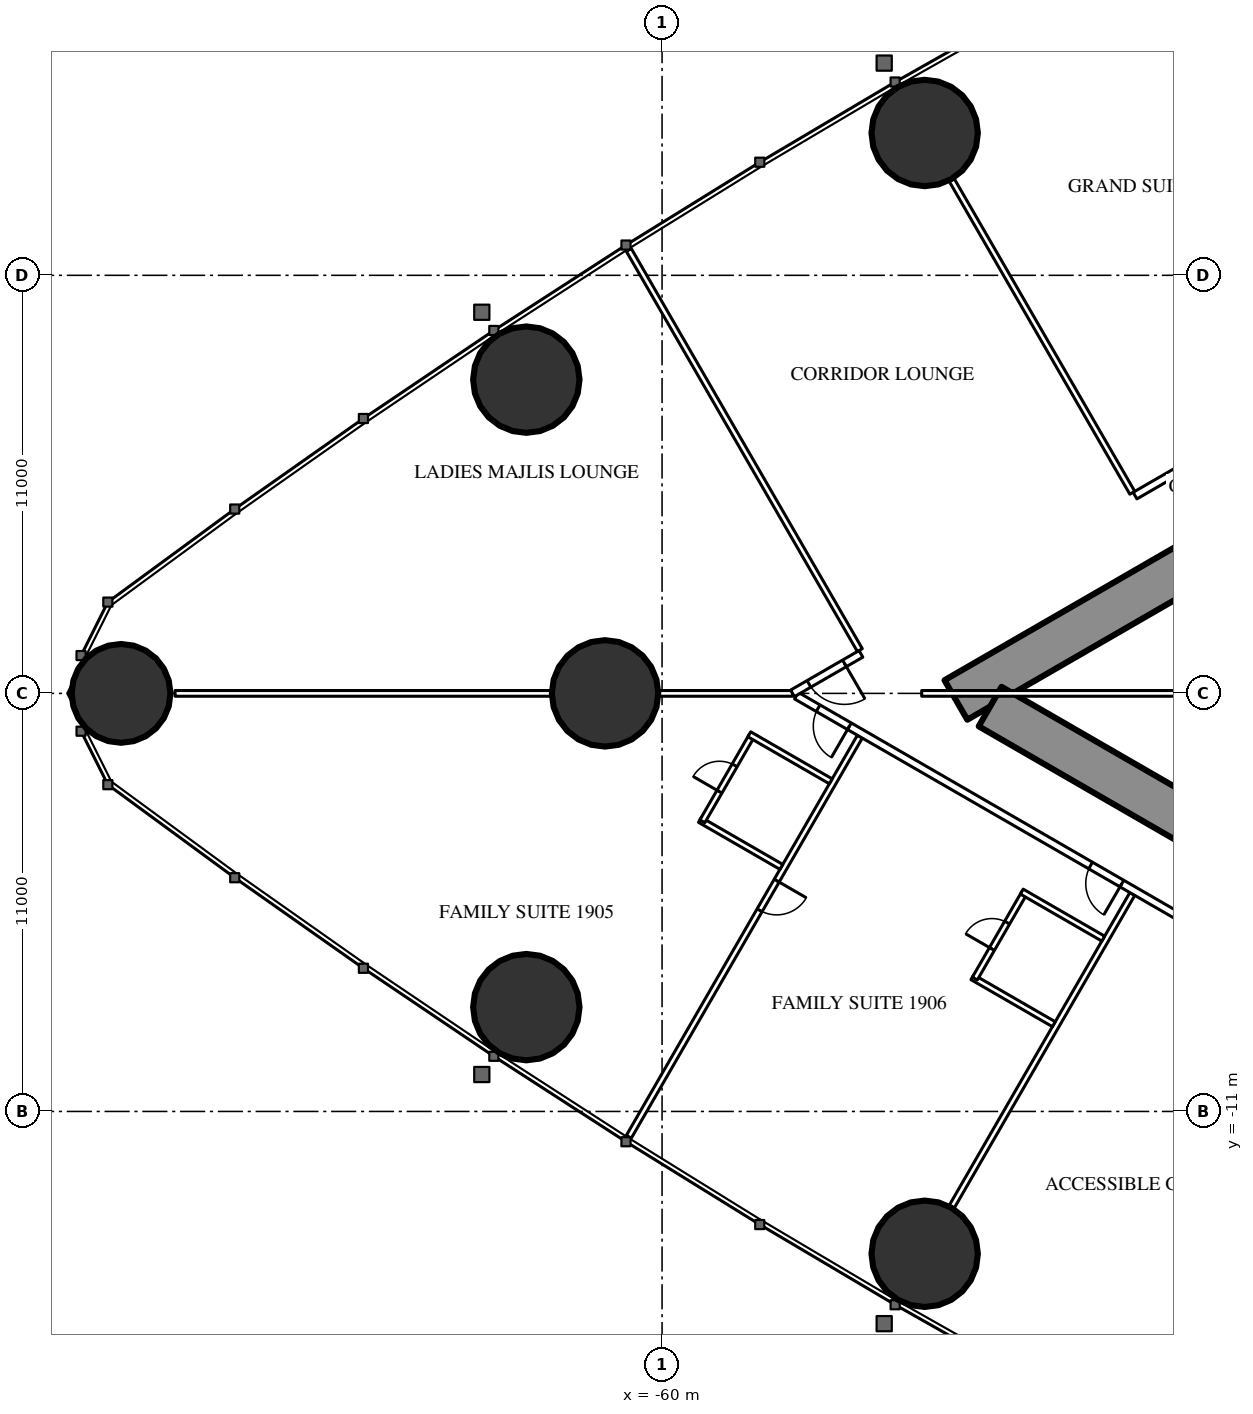
"""IFC4 building model, lengths in metres.
Left out: names, types, materials, properties, quantities, classifications, styles, units other than length and angle.
Written with IfcOpenShell. Run it as: python <this file> out.ifc"""

import sys

from ifc_helpers import new_model, si_unit, direction, frame, frame_2d, origin, origin_2d, place, context, subcontext, project, spatial, rectangle, hollow_circle, extrude, element, fill, save


model = new_model("IFC4")
c1 = context("Model", 3, precision=1e-05, world=origin(), true_north=direction((0.0, 1.0)))
c2 = subcontext(c1, "Body", "Model", "MODEL_VIEW")
j1 = project(units=[si_unit("LENGTHUNIT", "METRE"), si_unit("PLANEANGLEUNIT", "RADIAN")], contexts=[c1])
p1 = place(None, origin())
s1 = spatial("IfcSite", under=j1, at=p1, CompositionType="ELEMENT")
p2 = place(p1, origin())
s2 = spatial("IfcBuilding", under=s1, at=p2, CompositionType="ELEMENT")
p3 = place(p2, frame((0.0, 0.0, 74.0)))
s3 = spatial("IfcBuildingStorey", under=s2, at=p3, CompositionType="ELEMENT", Elevation=74.0)
p4 = place(p3, frame((-74.235, 0.0, 0.0), z_axis=(0.0, 0.0, 1.0), x_axis=(1.0, 0.0, 0.0)))
e1 = element("IfcColumn", 1, at=p4, inside=s3, PredefinedType="COLUMN", context=c2, shape_type="SweptSolid", body=[
    extrude(hollow_circle(Radius=1.3, WallThickness=0.1, at=origin_2d()), origin(), (0.0, 0.0, 1.0), 3.5),
])
for number, where, z_axis, x_axis in (
    (2, (-63.572, -8.255, 0.0), (0.0, 0.0, 1.0), (1.0, 0.0, 0.0)),
    (3, (-53.09, -14.745, 0.0), (0.0, 0.0, 1.0), (1.0, 0.0, 0.0)),
    (4, (-53.09, 14.745, 0.0), (0.0, 0.0, 1.0), (1.0, 0.0, 0.0)),
    (5, (-63.572, 8.255, 0.0), (0.0, 0.0, 1.0), (1.0, 0.0, 0.0)),
):
    element("IfcColumn", number, at=place(p3, frame(where, z_axis=z_axis, x_axis=x_axis)), inside=s3, PredefinedType="COLUMN", context=c2, shape_type="SweptSolid", body=[
        extrude(hollow_circle(Radius=1.4, WallThickness=0.12, at=origin_2d()), origin(), (0.0, 0.0, 1.0), 3.5),
    ])
p5 = place(p3, frame((-61.5, 0.0, 0.0), z_axis=(0.0, 0.0, 1.0), x_axis=(1.0, 0.0, 0.0)))
e6 = element("IfcColumn", 6, at=p5, inside=s3, PredefinedType="COLUMN", context=c2, shape_type="SweptSolid", body=[
    extrude(hollow_circle(Radius=1.4, WallThickness=0.1, at=origin_2d()), origin(), (0.0, 0.0, 1.0), 3.5),
])
p6 = place(p3, frame((-27.2, 14.3, 0.0), z_axis=(0.0, 0.0, 1.0), x_axis=(-0.866026593062, -0.499997940104, 0.0)))
e7 = element("IfcWall", 7, at=p6, inside=s3, PredefinedType="SHEAR", context=c2, shape_type="SweptSolid", body=[
    extrude(rectangle(XDim=28.946, YDim=1.2, at=frame_2d((14.473, 0.0))), origin(), (0.0, 0.0, 1.0), 3.5),
])
p7 = place(p6, frame((4.6, 0.0, 0.0)))
e8 = element("IfcOpeningElement", 8, at=p7, cuts=e7, PredefinedType="OPENING", context=c2, shape_type="SweptSolid", body=[
    extrude(rectangle(XDim=1.0, YDim=2.2, at=frame_2d((0.5, 1.1))), frame((0.0, 0.61, 0.0), z_axis=(0.0, -1.0, 0.0), x_axis=(1.0, 0.0, 0.0)), (0.0, 0.0, 1.0), 1.22),
])
p8 = place(p6, frame((13.395, 0.0, 0.0)))
e9 = element("IfcOpeningElement", 9, at=p8, cuts=e7, PredefinedType="OPENING", context=c2, shape_type="SweptSolid", body=[
    extrude(rectangle(XDim=1.8, YDim=2.2, at=frame_2d((0.9, 1.1))), frame((0.0, 0.61, 0.0), z_axis=(0.0, -1.0, 0.0), x_axis=(1.0, 0.0, 0.0)), (0.0, 0.0, 1.0), 1.22),
])
p9 = place(p3, frame((-27.2, -14.3, 0.0), z_axis=(0.0, 0.0, 1.0), x_axis=(-0.866024021859, 0.500002393557, 0.0)))
e10 = element("IfcWall", 10, at=p9, inside=s3, PredefinedType="SHEAR", context=c2, shape_type="SweptSolid", body=[
    extrude(rectangle(XDim=27.907, YDim=1.2, at=frame_2d((13.954, 0.0))), origin(), (0.0, 0.0, 1.0), 3.5),
])
p10 = place(p9, frame((4.6, 0.0, 0.0)))
e11 = element("IfcOpeningElement", 11, at=p10, cuts=e10, PredefinedType="OPENING", context=c2, shape_type="SweptSolid", body=[
    extrude(rectangle(XDim=1.0, YDim=2.2, at=frame_2d((0.5, 1.1))), frame((0.0, 0.61, 0.0), z_axis=(0.0, -1.0, 0.0), x_axis=(1.0, 0.0, 0.0)), (0.0, 0.0, 1.0), 1.22),
])
p11 = place(p9, frame((13.395, 0.0, 0.0)))
e12 = element("IfcOpeningElement", 12, at=p11, cuts=e10, PredefinedType="OPENING", context=c2, shape_type="SweptSolid", body=[
    extrude(rectangle(XDim=1.8, YDim=2.2, at=frame_2d((0.9, 1.1))), frame((0.0, 0.61, 0.0), z_axis=(0.0, -1.0, 0.0), x_axis=(1.0, 0.0, 0.0)), (0.0, 0.0, 1.0), 1.22),
])
p12 = place(p3, frame((-47.627, 5.278, 0.0), z_axis=(0.0, 0.0, 1.0), x_axis=(-0.500009844318, 0.86601972009, 0.0)))
e13 = element("IfcWall", 13, at=p12, inside=s3, PredefinedType="PARTITIONING", context=c2, shape_type="SweptSolid", body=[
    extrude(rectangle(XDim=9.51, YDim=0.15, at=frame_2d((4.755, 0.0))), origin(), (0.0, 0.0, 1.0), 2.25),
])
p13 = place(p3, frame((-54.796, 1.139, 0.0), z_axis=(0.0, 0.0, 1.0), x_axis=(-0.499998860433, 0.866026061713, 0.0)))
e14 = element("IfcWall", 14, at=p13, inside=s3, PredefinedType="PARTITIONING", context=c2, shape_type="SweptSolid", body=[
    extrude(rectangle(XDim=12.157, YDim=0.15, at=frame_2d((6.078, 0.0))), origin(), (0.0, 0.0, 1.0), 3.25),
])
p14 = place(p3, frame((-47.627, -5.278, 0.0), z_axis=(0.0, 0.0, 1.0), x_axis=(-0.500009844318, -0.86601972009, 0.0)))
e15 = element("IfcWall", 15, at=p14, inside=s3, PredefinedType="PARTITIONING", context=c2, shape_type="SweptSolid", body=[
    extrude(rectangle(XDim=9.51, YDim=0.15, at=frame_2d((4.755, 0.0))), origin(), (0.0, 0.0, 1.0), 2.25),
])
p15 = place(p3, frame((-54.796, -1.139, 0.0), z_axis=(0.0, 0.0, 1.0), x_axis=(-0.499998860433, -0.866026061713, 0.0)))
e16 = element("IfcWall", 16, at=p15, inside=s3, PredefinedType="PARTITIONING", context=c2, shape_type="SweptSolid", body=[
    extrude(rectangle(XDim=12.157, YDim=0.15, at=frame_2d((6.078, 0.0))), origin(), (0.0, 0.0, 1.0), 3.25),
])
p16 = place(p15, frame((4.375, 0.0, 0.0)))
e17 = element("IfcOpeningElement", 17, at=p16, cuts=e16, PredefinedType="OPENING", context=c2, shape_type="SweptSolid", body=[
    extrude(rectangle(XDim=0.9, YDim=2.2, at=frame_2d((0.45, 1.1))), frame((0.0, 0.085, 0.0), z_axis=(0.0, -1.0, 0.0), x_axis=(1.0, 0.0, 0.0)), (0.0, 0.0, 1.0), 0.17),
])
p17 = place(p3, frame((-56.568, 0.0, 0.0), z_axis=(0.0, 0.0, 1.0), x_axis=(-1.0, 0.0, 0.0)))
e18 = element("IfcWall", 18, at=p17, inside=s3, PredefinedType="PARTITIONING", context=c2, shape_type="SweptSolid", body=[
    extrude(rectangle(XDim=16.247, YDim=0.15, at=frame_2d((8.124, 0.0))), origin(), (0.0, 0.0, 1.0), 2.25),
])
p18 = place(p3, frame((-36.92, -11.344, 0.0), z_axis=(0.0, 0.0, 1.0), x_axis=(-0.866028313256, 0.499994960614, 0.0)))
e19 = element("IfcWall", 19, at=p18, inside=s3, PredefinedType="PARTITIONING", context=c2, shape_type="SweptSolid", body=[
    extrude(rectangle(XDim=22.568, YDim=0.2, at=frame_2d((11.284, 0.0))), origin(), (0.0, 0.0, 1.0), 3.25),
])
p19 = place(p18, frame((20.958, 0.0, 0.0)))
e20 = element("IfcOpeningElement", 20, at=p19, cuts=e19, PredefinedType="OPENING", context=c2, shape_type="SweptSolid", body=[
    extrude(rectangle(XDim=0.95, YDim=2.2, at=frame_2d((0.475, 1.1))), frame((0.0, 0.11, 0.0), z_axis=(0.0, -1.0, 0.0), x_axis=(1.0, 0.0, 0.0)), (0.0, 0.0, 1.0), 0.22),
])
p20 = place(p18, frame((12.68, 0.0, 0.0)))
e21 = element("IfcOpeningElement", 21, at=p20, cuts=e19, PredefinedType="OPENING", context=c2, shape_type="SweptSolid", body=[
    extrude(rectangle(XDim=0.95, YDim=2.2, at=frame_2d((0.475, 1.1))), frame((0.0, 0.11, 0.0), z_axis=(0.0, -1.0, 0.0), x_axis=(1.0, 0.0, 0.0)), (0.0, 0.0, 1.0), 0.22),
])
p21 = place(p18, frame((3.35, 0.0, 0.0)))
e22 = element("IfcOpeningElement", 22, at=p21, cuts=e19, PredefinedType="OPENING", context=c2, shape_type="SweptSolid", body=[
    extrude(rectangle(XDim=1.0, YDim=2.2, at=frame_2d((0.5, 1.1))), frame((0.0, 0.11, 0.0), z_axis=(0.0, -1.0, 0.0), x_axis=(1.0, 0.0, 0.0)), (0.0, 0.0, 1.0), 0.22),
])
p22 = place(p3, frame((-37.7, 10.894, 0.0), z_axis=(0.0, 0.0, 1.0), x_axis=(-0.866024459167, -0.500001636122, 0.0)))
e23 = element("IfcWall", 23, at=p22, inside=s3, PredefinedType="PARTITIONING", context=c2, shape_type="SweptSolid", body=[
    extrude(rectangle(XDim=11.38, YDim=0.2, at=frame_2d((5.69, 0.0))), origin(), (0.0, 0.0, 1.0), 3.25),
])
p23 = place(p22, frame((0.6, 0.0, 0.0)))
e24 = element("IfcOpeningElement", 24, at=p23, cuts=e23, PredefinedType="OPENING", context=c2, shape_type="SweptSolid", body=[
    extrude(rectangle(XDim=0.95, YDim=2.2, at=frame_2d((0.475, 1.1))), frame((0.0, 0.11, 0.0), z_axis=(0.0, -1.0, 0.0), x_axis=(1.0, 0.0, 0.0)), (0.0, 0.0, 1.0), 0.22),
])
p24 = place(p3, frame((-54.768, 1.04, 0.0), z_axis=(0.0, 0.0, 1.0), x_axis=(-0.866052632827, -0.499952834948, 0.0)))
e25 = element("IfcWall", 25, at=p24, inside=s3, PredefinedType="PARTITIONING", context=c2, shape_type="SweptSolid", body=[
    extrude(rectangle(XDim=2.079, YDim=0.2, at=frame_2d((1.04, 0.0))), origin(), (0.0, 0.0, 1.0), 3.25),
])
p25 = place(p24, frame((0.5, 0.0, 0.0)))
e26 = element("IfcOpeningElement", 26, at=p25, cuts=e25, PredefinedType="OPENING", context=c2, shape_type="SweptSolid", body=[
    extrude(rectangle(XDim=1.079, YDim=2.2, at=frame_2d((0.54, 1.1))), frame((0.0, 0.11, 0.0), z_axis=(0.0, -1.0, 0.0), x_axis=(1.0, 0.0, 0.0)), (0.0, 0.0, 1.0), 0.22),
])
p26 = place(p3, frame((-56.861, -4.565, 0.0), z_axis=(0.0, 0.0, 1.0), x_axis=(-0.86604923931, 0.499958713387, 0.0)))
e27 = element("IfcWall", 27, at=p26, inside=s3, PredefinedType="PARTITIONING", context=c2, shape_type="SweptSolid", body=[
    extrude(rectangle(XDim=2.475, YDim=0.15, at=frame_2d((1.237, 0.0))), origin(), (0.0, 0.0, 1.0), 3.25),
])
p27 = place(p3, frame((-57.639, -1.114, 0.0), z_axis=(0.0, 0.0, 1.0), x_axis=(-0.500006934395, -0.866021400173, 0.0)))
e28 = element("IfcWall", 28, at=p27, inside=s3, PredefinedType="PARTITIONING", context=c2, shape_type="SweptSolid", body=[
    extrude(rectangle(XDim=2.6, YDim=0.15, at=frame_2d((1.3, 0.0))), origin(), (0.0, 0.0, 1.0), 3.25),
])
p28 = place(p27, frame((0.9, 0.0, 0.0)))
e29 = element("IfcOpeningElement", 29, at=p28, cuts=e28, PredefinedType="OPENING", context=c2, shape_type="SweptSolid", body=[
    extrude(rectangle(XDim=0.8, YDim=2.2, at=frame_2d((0.4, 1.1))), frame((0.0, 0.085, 0.0), z_axis=(0.0, -1.0, 0.0), x_axis=(1.0, 0.0, 0.0)), (0.0, 0.0, 1.0), 0.17),
])
p29 = place(p3, frame((-55.561, -2.313, 0.0), z_axis=(0.0, 0.0, 1.0), x_axis=(-0.86604923931, 0.499958713387, 0.0)))
e30 = element("IfcWall", 30, at=p29, inside=s3, PredefinedType="PARTITIONING", context=c2, shape_type="SweptSolid", body=[
    extrude(rectangle(XDim=2.475, YDim=0.15, at=frame_2d((1.237, 0.0))), origin(), (0.0, 0.0, 1.0), 3.25),
])
p30 = place(p3, frame((-49.692, -8.704, 0.0), z_axis=(0.0, 0.0, 1.0), x_axis=(-0.866073894602, 0.499916002032, 0.0)))
e31 = element("IfcWall", 31, at=p30, inside=s3, PredefinedType="PARTITIONING", context=c2, shape_type="SweptSolid", body=[
    extrude(rectangle(XDim=2.475, YDim=0.15, at=frame_2d((1.238, 0.0))), origin(), (0.0, 0.0, 1.0), 3.25),
])
p31 = place(p3, frame((-50.47, -5.253, 0.0), z_axis=(0.0, 0.0, 1.0), x_axis=(-0.500006934395, -0.866021400173, 0.0)))
e32 = element("IfcWall", 32, at=p31, inside=s3, PredefinedType="PARTITIONING", context=c2, shape_type="SweptSolid", body=[
    extrude(rectangle(XDim=2.6, YDim=0.15, at=frame_2d((1.3, 0.0))), origin(), (0.0, 0.0, 1.0), 3.25),
])
p32 = place(p31, frame((0.9, 0.0, 0.0)))
e33 = element("IfcOpeningElement", 33, at=p32, cuts=e32, PredefinedType="OPENING", context=c2, shape_type="SweptSolid", body=[
    extrude(rectangle(XDim=0.8, YDim=2.2, at=frame_2d((0.4, 1.1))), frame((0.0, 0.085, 0.0), z_axis=(0.0, -1.0, 0.0), x_axis=(1.0, 0.0, 0.0)), (0.0, 0.0, 1.0), 0.17),
])
p33 = place(p3, frame((-48.392, -6.453, 0.0), z_axis=(0.0, 0.0, 1.0), x_axis=(-0.86604923931, 0.499958713387, 0.0)))
e34 = element("IfcWall", 34, at=p33, inside=s3, PredefinedType="PARTITIONING", context=c2, shape_type="SweptSolid", body=[
    extrude(rectangle(XDim=2.475, YDim=0.15, at=frame_2d((1.237, 0.0))), origin(), (0.0, 0.0, 1.0), 3.25),
])
p34 = place(p3, frame((-44.575, 0.0, 0.0), z_axis=(0.0, 0.0, 1.0), x_axis=(-1.0, 0.0, 0.0)))
e35 = element("IfcWall", 35, at=p34, inside=s3, PredefinedType="PARTITIONING", context=c2, shape_type="SweptSolid", body=[
    extrude(rectangle(XDim=8.593, YDim=0.15, at=frame_2d((4.297, 0.0))), origin(), (0.0, 0.0, 1.0), 2.25),
])
p35 = place(p25, origin())
e36 = element("IfcDoor", 36, at=p35, inside=s3, OperationType="SINGLE_SWING_LEFT", PredefinedType="DOOR", context=c2, shape_type="SweptSolid", body=[
    extrude(rectangle(XDim=1.079, YDim=2.2, at=frame_2d((0.54, 1.1))), frame((0.0, 0.025, 0.0), z_axis=(0.0, -1.0, 0.0), x_axis=(1.0, 0.0, 0.0)), (0.0, 0.0, 1.0), 0.05),
])
fill(e26, e36)
p36 = place(p28, origin())
e37 = element("IfcDoor", 37, at=p36, inside=s3, OperationType="SINGLE_SWING_RIGHT", PredefinedType="DOOR", context=c2, shape_type="SweptSolid", body=[
    extrude(rectangle(XDim=0.8, YDim=2.2, at=frame_2d((0.4, 1.1))), frame((0.0, 0.025, 0.0), z_axis=(0.0, -1.0, 0.0), x_axis=(1.0, 0.0, 0.0)), (0.0, 0.0, 1.0), 0.05),
])
fill(e29, e37)
p37 = place(p19, origin())
e38 = element("IfcDoor", 38, at=p37, inside=s3, OperationType="SINGLE_SWING_LEFT", PredefinedType="DOOR", context=c2, shape_type="SweptSolid", body=[
    extrude(rectangle(XDim=0.95, YDim=2.2, at=frame_2d((0.475, 1.1))), frame((0.0, 0.025, 0.0), z_axis=(0.0, -1.0, 0.0), x_axis=(1.0, 0.0, 0.0)), (0.0, 0.0, 1.0), 0.05),
])
fill(e20, e38)
p38 = place(p32, origin())
e39 = element("IfcDoor", 39, at=p38, inside=s3, OperationType="SINGLE_SWING_RIGHT", PredefinedType="DOOR", context=c2, shape_type="SweptSolid", body=[
    extrude(rectangle(XDim=0.8, YDim=2.2, at=frame_2d((0.4, 1.1))), frame((0.0, 0.025, 0.0), z_axis=(0.0, -1.0, 0.0), x_axis=(1.0, 0.0, 0.0)), (0.0, 0.0, 1.0), 0.05),
])
fill(e33, e39)
p39 = place(p20, origin())
e40 = element("IfcDoor", 40, at=p39, inside=s3, OperationType="SINGLE_SWING_LEFT", PredefinedType="DOOR", context=c2, shape_type="SweptSolid", body=[
    extrude(rectangle(XDim=0.95, YDim=2.2, at=frame_2d((0.475, 1.1))), frame((0.0, 0.025, 0.0), z_axis=(0.0, -1.0, 0.0), x_axis=(1.0, 0.0, 0.0)), (0.0, 0.0, 1.0), 0.05),
])
fill(e21, e40)
p40 = place(p16, origin())
e41 = element("IfcDoor", 41, at=p40, inside=s3, OperationType="SINGLE_SWING_LEFT", PredefinedType="DOOR", context=c2, shape_type="SweptSolid", body=[
    extrude(rectangle(XDim=0.9, YDim=2.2, at=frame_2d((0.45, 1.1))), frame((0.0, 0.025, 0.0), z_axis=(0.0, -1.0, 0.0), x_axis=(1.0, 0.0, 0.0)), (0.0, 0.0, 1.0), 0.05),
])
fill(e17, e41)
save(model, sys.argv[1])
